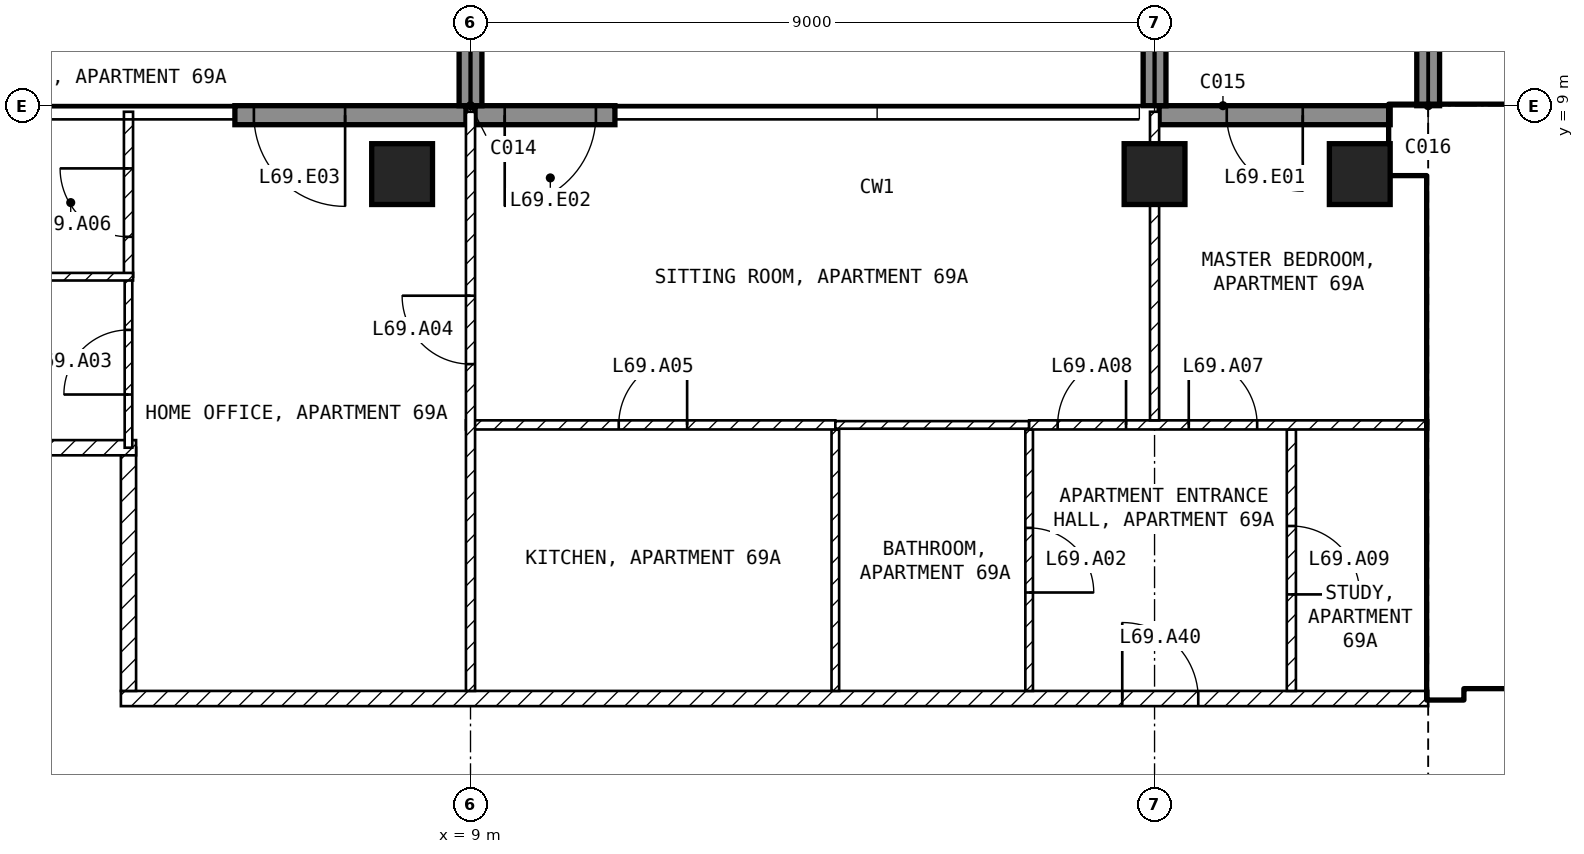
"""IFC4 building model, lengths in metres.
Left out: names, types, materials, properties, quantities, classifications, styles, units other than length and angle.
Written with IfcOpenShell. Run it as: python <this file> out.ifc"""

import sys

from ifc_helpers import new_model, si_unit, direction, frame, frame_2d, origin, origin_2d, place, context, subcontext, project, spatial, rectangle, extrude, element, fill, save


model = new_model("IFC4")
c1 = context("Model", 3, precision=1e-05, world=origin(), true_north=direction((0.0, 1.0)))
c2 = subcontext(c1, "Body", "Model", "MODEL_VIEW")
j1 = project(units=[si_unit("LENGTHUNIT", "METRE"), si_unit("PLANEANGLEUNIT", "RADIAN")], contexts=[c1])
p1 = place(None, origin())
s1 = spatial("IfcSite", under=j1, at=p1, CompositionType="ELEMENT")
p2 = place(p1, origin())
s2 = spatial("IfcBuilding", under=s1, at=p2, CompositionType="ELEMENT")
p3 = place(p2, frame((0.0, 0.0, 271.0)))
s3 = spatial("IfcBuildingStorey", under=s2, at=p3, CompositionType="ELEMENT", Elevation=271.0)
for number, where, z_axis, x_axis in (
    (1, (8.1, 8.1, -0.25), (0.0, 0.0, 1.0), (1.0, 0.0, 0.0)),
    (2, (18.0, 8.1, -0.25), (0.0, 0.0, 1.0), (1.0, 0.0, 0.0)),
    (3, (20.7, 8.1, -0.25), (0.0, 0.0, 1.0), (1.0, 0.0, 0.0)),
):
    element("IfcColumn", number, at=place(p3, frame(where, z_axis=z_axis, x_axis=x_axis)), inside=s3, PredefinedType="COLUMN", context=c2, shape_type="SweptSolid", body=[
        extrude(rectangle(XDim=0.8, YDim=0.8, at=origin_2d()), origin(), (0.0, 0.0, 1.0), 3.5),
    ])
p4 = place(p3, frame((21.1, 8.875, 0.0), z_axis=(0.0, 0.0, 1.0), x_axis=(-1.0, 0.0, 0.0)))
e4 = element("IfcWall", 4, at=p4, inside=s3, PredefinedType="SOLIDWALL", context=c2, shape_type="SweptSolid", body=[
    extrude(rectangle(XDim=3.04, YDim=0.25, at=frame_2d((1.52, 0.0))), origin(), (0.0, 0.0, 1.0), 3.25),
])
p5 = place(p4, frame((1.15, 0.0, 0.0)))
e5 = element("IfcOpeningElement", 5, at=p5, cuts=e4, PredefinedType="OPENING", context=c2, shape_type="SweptSolid", body=[
    extrude(rectangle(XDim=1.0, YDim=2.4, at=frame_2d((0.5, 1.2))), frame((0.0, 0.135, 0.0), z_axis=(0.0, -1.0, 0.0), x_axis=(1.0, 0.0, 0.0)), (0.0, 0.0, 1.0), 0.27),
])
p6 = place(p3, frame((10.9, 8.875, 0.0), z_axis=(0.0, 0.0, 1.0), x_axis=(-1.0, 0.0, 0.0)))
e6 = element("IfcWall", 6, at=p6, inside=s3, PredefinedType="SOLIDWALL", context=c2, shape_type="SweptSolid", body=[
    extrude(rectangle(XDim=1.84, YDim=0.25, at=frame_2d((0.92, 0.0))), origin(), (0.0, 0.0, 1.0), 3.25),
])
p7 = place(p6, frame((0.25, 0.0, 0.0)))
e7 = element("IfcOpeningElement", 7, at=p7, cuts=e6, PredefinedType="OPENING", context=c2, shape_type="SweptSolid", body=[
    extrude(rectangle(XDim=1.2, YDim=2.4, at=frame_2d((0.6, 1.2))), frame((0.0, 0.135, 0.0), z_axis=(0.0, -1.0, 0.0), x_axis=(1.0, 0.0, 0.0)), (0.0, 0.0, 1.0), 0.27),
])
p8 = place(p3, frame((8.94, 8.875, 0.0), z_axis=(0.0, 0.0, 1.0), x_axis=(-1.0, 0.0, 0.0)))
e8 = element("IfcWall", 8, at=p8, inside=s3, PredefinedType="SOLIDWALL", context=c2, shape_type="SweptSolid", body=[
    extrude(rectangle(XDim=3.04, YDim=0.25, at=frame_2d((1.52, 0.0))), origin(), (0.0, 0.0, 1.0), 3.25),
])
p9 = place(p8, frame((1.59, 0.0, 0.0)))
e9 = element("IfcOpeningElement", 9, at=p9, cuts=e8, PredefinedType="OPENING", context=c2, shape_type="SweptSolid", body=[
    extrude(rectangle(XDim=1.2, YDim=2.4, at=frame_2d((0.6, 1.2))), frame((0.0, 0.135, 0.0), z_axis=(0.0, -1.0, 0.0), x_axis=(1.0, 0.0, 0.0)), (0.0, 0.0, 1.0), 0.27),
])
for number, where, z_axis, x_axis in (
    (10, (9.0, 9.0, 0.0), (0.0, 0.0, 1.0), (0.0, 1.0, 0.0)),
    (11, (18.0, 9.0, 0.0), (0.0, 0.0, 1.0), (0.0, 1.0, 0.0)),
    (12, (21.6, 9.0, 0.0), (0.0, 0.0, 1.0), (0.0, 1.0, 0.0)),
):
    element("IfcWall", number, at=place(p3, frame(where, z_axis=z_axis, x_axis=x_axis)), inside=s3, PredefinedType="SOLIDWALL", context=c2, shape_type="SweptSolid", body=[
        extrude(rectangle(XDim=2.7, YDim=0.3, at=frame_2d((1.35, 0.0))), origin(), (0.0, 0.0, 1.0), 3.25),
    ])
p10 = place(p3, frame((21.1, 8.55, 0.0), z_axis=(0.0, 0.0, 1.0), x_axis=(1.0, 0.0, 0.0)))
e13 = element("IfcWall", 13, at=p10, inside=s3, PredefinedType="SHEAR", context=c2, shape_type="SweptSolid", body=[
    extrude(rectangle(XDim=8.65, YDim=0.9, at=frame_2d((4.325, 0.0))), origin(), (0.0, 0.0, 1.0), 3.25),
])
p11 = place(p3, frame((21.825, 1.2, 0.0), z_axis=(0.0, 0.0, 1.0), x_axis=(0.0, 1.0, 0.0)))
e14 = element("IfcWall", 14, at=p11, inside=s3, PredefinedType="SHEAR", context=c2, shape_type="SweptSolid", body=[
    extrude(rectangle(XDim=6.9, YDim=0.45, at=frame_2d((3.45, 0.0))), origin(), (0.0, 0.0, 1.0), 3.25),
])
p12 = place(p3, frame((22.05, 1.45, 0.0), z_axis=(0.0, 0.0, 1.0), x_axis=(1.0, 0.0, 0.0)))
e15 = element("IfcWall", 15, at=p12, inside=s3, PredefinedType="SOLIDWALL", context=c2, shape_type="SweptSolid", body=[
    extrude(rectangle(XDim=11.3, YDim=0.2, at=frame_2d((5.65, 0.0))), origin(), (0.0, 0.0, 1.0), 3.25),
])
p13 = place(p12, frame((0.75, 0.0, 0.0)))
e16 = element("IfcOpeningElement", 16, at=p13, cuts=e15, PredefinedType="OPENING", context=c2, shape_type="SweptSolid", body=[
    extrude(rectangle(XDim=1.0, YDim=2.1, at=frame_2d((0.5, 1.05))), frame((0.0, 0.11, 0.0), z_axis=(0.0, -1.0, 0.0), x_axis=(1.0, 0.0, 0.0)), (0.0, 0.0, 1.0), 0.22),
])
p14 = place(p12, frame((3.25, 0.0, 0.0)))
e17 = element("IfcOpeningElement", 17, at=p14, cuts=e15, PredefinedType="OPENING", context=c2, shape_type="SweptSolid", body=[
    extrude(rectangle(XDim=1.0, YDim=2.1, at=frame_2d((0.5, 1.05))), frame((0.0, 0.11, 0.0), z_axis=(0.0, -1.0, 0.0), x_axis=(1.0, 0.0, 0.0)), (0.0, 0.0, 1.0), 0.22),
])
p15 = place(p12, frame((9.225, 0.0, 0.0)))
e18 = element("IfcOpeningElement", 18, at=p15, cuts=e15, PredefinedType="OPENING", context=c2, shape_type="SweptSolid", body=[
    extrude(rectangle(XDim=0.9, YDim=2.1, at=frame_2d((0.45, 1.05))), frame((0.0, 0.11, 0.0), z_axis=(0.0, -1.0, 0.0), x_axis=(1.0, 0.0, 0.0)), (0.0, 0.0, 1.0), 0.22),
])
p16 = place(p3, frame((22.05, 5.15, 0.0), z_axis=(0.0, 0.0, 1.0), x_axis=(1.0, 0.0, 0.0)))
e19 = element("IfcWall", 19, at=p16, inside=s3, PredefinedType="SOLIDWALL", context=c2, shape_type="SweptSolid", body=[
    extrude(rectangle(XDim=6.3, YDim=0.2, at=frame_2d((3.15, 0.0))), origin(), (0.0, 0.0, 1.0), 3.25),
])
p17 = place(p16, frame((0.2, 0.0, 0.0)))
e20 = element("IfcOpeningElement", 20, at=p17, cuts=e19, PredefinedType="OPENING", context=c2, shape_type="SweptSolid", body=[
    extrude(rectangle(XDim=1.0, YDim=2.1, at=frame_2d((0.5, 1.05))), frame((0.0, 0.11, 0.0), z_axis=(0.0, -1.0, 0.0), x_axis=(1.0, 0.0, 0.0)), (0.0, 0.0, 1.0), 0.22),
])
p18 = place(p3, frame((4.4, 1.2, 0.0), z_axis=(0.0, 0.0, 1.0), x_axis=(1.0, 0.0, 0.0)))
e21 = element("IfcWall", 21, at=p18, inside=s3, PredefinedType="PARTITIONING", context=c2, shape_type="SweptSolid", body=[
    extrude(rectangle(XDim=17.2, YDim=0.2, at=frame_2d((8.6, 0.0))), origin(), (0.0, 0.0, 1.0), 3.25),
])
p19 = place(p18, frame((13.175, 0.0, 0.0)))
e22 = element("IfcOpeningElement", 22, at=p19, cuts=e21, PredefinedType="OPENING", context=c2, shape_type="SweptSolid", body=[
    extrude(rectangle(XDim=1.0, YDim=2.1, at=frame_2d((0.5, 1.05))), frame((0.0, 0.11, 0.0), z_axis=(0.0, -1.0, 0.0), x_axis=(1.0, 0.0, 0.0)), (0.0, 0.0, 1.0), 0.22),
])
p20 = place(p3, frame((4.5, 4.5, 0.0), z_axis=(0.0, 0.0, 1.0), x_axis=(0.0, -1.0, 0.0)))
e23 = element("IfcWall", 23, at=p20, inside=s3, PredefinedType="PARTITIONING", context=c2, shape_type="SweptSolid", body=[
    extrude(rectangle(XDim=3.2, YDim=0.2, at=frame_2d((1.6, 0.0))), origin(), (0.0, 0.0, 1.0), 3.25),
])
p21 = place(p3, frame((1.1, 4.5, 0.0), z_axis=(0.0, 0.0, 1.0), x_axis=(1.0, 0.0, 0.0)))
e24 = element("IfcWall", 24, at=p21, inside=s3, PredefinedType="PARTITIONING", context=c2, shape_type="SweptSolid", body=[
    extrude(rectangle(XDim=3.5, YDim=0.2, at=frame_2d((1.75, 0.0))), origin(), (0.0, 0.0, 1.0), 3.25),
])
p22 = place(p3, frame((13.8, 4.74, 0.0), z_axis=(0.0, 0.0, 1.0), x_axis=(0.0, -1.0, 0.0)))
e25 = element("IfcWall", 25, at=p22, inside=s3, PredefinedType="PARTITIONING", context=c2, shape_type="SweptSolid", body=[
    extrude(rectangle(XDim=3.44, YDim=0.1, at=frame_2d((1.72, 0.0))), origin(), (0.0, 0.0, 1.0), 3.25),
])
p23 = place(p3, frame((8.94, 4.8, 0.0), z_axis=(0.0, 0.0, 1.0), x_axis=(1.0, 0.0, 0.0)))
e26 = element("IfcWall", 26, at=p23, inside=s3, PredefinedType="PARTITIONING", context=c2, shape_type="SweptSolid", body=[
    extrude(rectangle(XDim=4.86, YDim=0.12, at=frame_2d((2.43, 0.0))), origin(), (0.0, 0.0, 1.0), 3.25),
])
p24 = place(p23, frame((2.01, 0.0, 0.0)))
e27 = element("IfcOpeningElement", 27, at=p24, cuts=e26, PredefinedType="OPENING", context=c2, shape_type="SweptSolid", body=[
    extrude(rectangle(XDim=0.9, YDim=2.1, at=frame_2d((0.45, 1.05))), frame((0.0, 0.07, 0.0), z_axis=(0.0, -1.0, 0.0), x_axis=(1.0, 0.0, 0.0)), (0.0, 0.0, 1.0), 0.14),
])
p25 = place(p3, frame((9.0, 1.3, 0.0), z_axis=(0.0, 0.0, 1.0), x_axis=(0.0, 1.0, 0.0)))
e28 = element("IfcWall", 28, at=p25, inside=s3, PredefinedType="PARTITIONING", context=c2, shape_type="SweptSolid", body=[
    extrude(rectangle(XDim=7.62, YDim=0.12, at=frame_2d((3.81, 0.0))), origin(), (0.0, 0.0, 1.0), 3.25),
])
p26 = place(p25, frame((4.3, 0.0, 0.0)))
e29 = element("IfcOpeningElement", 29, at=p26, cuts=e28, PredefinedType="OPENING", context=c2, shape_type="SweptSolid", body=[
    extrude(rectangle(XDim=0.9, YDim=2.1, at=frame_2d((0.45, 1.05))), frame((0.0, 0.07, 0.0), z_axis=(0.0, -1.0, 0.0), x_axis=(1.0, 0.0, 0.0)), (0.0, 0.0, 1.0), 0.14),
])
p27 = place(p3, frame((16.35, 4.74, 0.0), z_axis=(0.0, 0.0, 1.0), x_axis=(0.0, -1.0, 0.0)))
e30 = element("IfcWall", 30, at=p27, inside=s3, PredefinedType="PARTITIONING", context=c2, shape_type="SweptSolid", body=[
    extrude(rectangle(XDim=3.44, YDim=0.1, at=frame_2d((1.72, 0.0))), origin(), (0.0, 0.0, 1.0), 3.25),
])
p28 = place(p27, frame((1.295, 0.0, 0.0)))
e31 = element("IfcOpeningElement", 31, at=p28, cuts=e30, PredefinedType="OPENING", context=c2, shape_type="SweptSolid", body=[
    extrude(rectangle(XDim=0.85, YDim=2.1, at=frame_2d((0.425, 1.05))), frame((0.0, 0.06, 0.0), z_axis=(0.0, -1.0, 0.0), x_axis=(1.0, 0.0, 0.0)), (0.0, 0.0, 1.0), 0.12),
])
p29 = place(p3, frame((13.8, 4.8, 0.0), z_axis=(0.0, 0.0, 1.0), x_axis=(1.0, 0.0, 0.0)))
e32 = element("IfcWall", 32, at=p29, inside=s3, PredefinedType="PARTITIONING", context=c2, shape_type="SweptSolid", body=[
    extrude(rectangle(XDim=2.55, YDim=0.1, at=frame_2d((1.275, 0.0))), origin(), (0.0, 0.0, 1.0), 3.25),
])
p30 = place(p3, frame((19.8, 4.74, 0.0), z_axis=(0.0, 0.0, 1.0), x_axis=(0.0, -1.0, 0.0)))
e33 = element("IfcWall", 33, at=p30, inside=s3, PredefinedType="PARTITIONING", context=c2, shape_type="SweptSolid", body=[
    extrude(rectangle(XDim=3.44, YDim=0.12, at=frame_2d((1.72, 0.0))), origin(), (0.0, 0.0, 1.0), 3.25),
])
p31 = place(p30, frame((1.27, 0.0, 0.0)))
e34 = element("IfcOpeningElement", 34, at=p31, cuts=e33, PredefinedType="OPENING", context=c2, shape_type="SweptSolid", body=[
    extrude(rectangle(XDim=0.9, YDim=2.1, at=frame_2d((0.45, 1.05))), frame((0.0, 0.07, 0.0), z_axis=(0.0, -1.0, 0.0), x_axis=(1.0, 0.0, 0.0)), (0.0, 0.0, 1.0), 0.14),
])
p32 = place(p3, frame((16.35, 4.8, 0.0), z_axis=(0.0, 0.0, 1.0), x_axis=(1.0, 0.0, 0.0)))
e35 = element("IfcWall", 35, at=p32, inside=s3, PredefinedType="PARTITIONING", context=c2, shape_type="SweptSolid", body=[
    extrude(rectangle(XDim=5.25, YDim=0.12, at=frame_2d((2.625, 0.0))), origin(), (0.0, 0.0, 1.0), 3.25),
])
p33 = place(p32, frame((2.1, 0.0, 0.0)))
e36 = element("IfcOpeningElement", 36, at=p33, cuts=e35, PredefinedType="OPENING", context=c2, shape_type="SweptSolid", body=[
    extrude(rectangle(XDim=0.9, YDim=2.1, at=frame_2d((0.45, 1.05))), frame((0.0, 0.07, 0.0), z_axis=(0.0, -1.0, 0.0), x_axis=(1.0, 0.0, 0.0)), (0.0, 0.0, 1.0), 0.14),
])
p34 = place(p32, frame((0.375, 0.0, 0.0)))
e37 = element("IfcOpeningElement", 37, at=p34, cuts=e35, PredefinedType="OPENING", context=c2, shape_type="SweptSolid", body=[
    extrude(rectangle(XDim=0.9, YDim=2.1, at=frame_2d((0.45, 1.05))), frame((0.0, 0.07, 0.0), z_axis=(0.0, -1.0, 0.0), x_axis=(1.0, 0.0, 0.0)), (0.0, 0.0, 1.0), 0.14),
])
p35 = place(p3, frame((18.0, 8.92, 0.0), z_axis=(0.0, 0.0, 1.0), x_axis=(0.0, -1.0, 0.0)))
e38 = element("IfcWall", 38, at=p35, inside=s3, PredefinedType="PARTITIONING", context=c2, shape_type="SweptSolid", body=[
    extrude(rectangle(XDim=4.06, YDim=0.12, at=frame_2d((2.03, 0.0))), origin(), (0.0, 0.0, 1.0), 2.496),
])
p36 = place(p3, frame((4.5, 4.5, 0.0), z_axis=(0.0, 0.0, 1.0), x_axis=(0.0, 1.0, 0.0)))
e39 = element("IfcWall", 39, at=p36, inside=s3, PredefinedType="PARTITIONING", context=c2, shape_type="SweptSolid", body=[
    extrude(rectangle(XDim=2.25, YDim=0.1, at=frame_2d((1.125, 0.0))), origin(), (0.0, 0.0, 1.0), 3.25),
])
p37 = place(p36, frame((0.7, 0.0, 0.0)))
e40 = element("IfcOpeningElement", 40, at=p37, cuts=e39, PredefinedType="OPENING", context=c2, shape_type="SweptSolid", body=[
    extrude(rectangle(XDim=0.85, YDim=2.1, at=frame_2d((0.425, 1.05))), frame((0.0, 0.06, 0.0), z_axis=(0.0, -1.0, 0.0), x_axis=(1.0, 0.0, 0.0)), (0.0, 0.0, 1.0), 0.12),
])
p38 = place(p3, frame((4.5, 6.75, 0.0), z_axis=(0.0, 0.0, 1.0), x_axis=(0.0, 1.0, 0.0)))
e41 = element("IfcWall", 41, at=p38, inside=s3, PredefinedType="PARTITIONING", context=c2, shape_type="SweptSolid", body=[
    extrude(rectangle(XDim=2.17, YDim=0.12, at=frame_2d((1.085, 0.0))), origin(), (0.0, 0.0, 1.0), 3.25),
])
p39 = place(p38, frame((0.525, 0.0, 0.0)))
e42 = element("IfcOpeningElement", 42, at=p39, cuts=e41, PredefinedType="OPENING", context=c2, shape_type="SweptSolid", body=[
    extrude(rectangle(XDim=0.9, YDim=2.1, at=frame_2d((0.45, 1.05))), frame((0.0, 0.07, 0.0), z_axis=(0.0, -1.0, 0.0), x_axis=(1.0, 0.0, 0.0)), (0.0, 0.0, 1.0), 0.14),
])
p40 = place(p3, frame((1.1, 6.75, 0.0), z_axis=(0.0, 0.0, 1.0), x_axis=(1.0, 0.0, 0.0)))
e43 = element("IfcWall", 43, at=p40, inside=s3, PredefinedType="PARTITIONING", context=c2, shape_type="SweptSolid", body=[
    extrude(rectangle(XDim=3.46, YDim=0.1, at=frame_2d((1.73, 0.0))), origin(), (0.0, 0.0, 1.0), 3.25),
])
p41 = place(p5, origin())
e44 = element("IfcDoor", 44, at=p41, inside=s3, OperationType="SINGLE_SWING_LEFT", PredefinedType="DOOR", context=c2, shape_type="SweptSolid", body=[
    extrude(rectangle(XDim=1.0, YDim=2.4, at=frame_2d((0.5, 1.2))), frame((0.0, 0.025, 0.0), z_axis=(0.0, -1.0, 0.0), x_axis=(1.0, 0.0, 0.0)), (0.0, 0.0, 1.0), 0.05),
])
fill(e5, e44)
p42 = place(p7, origin())
e45 = element("IfcDoor", 45, at=p42, inside=s3, OperationType="SINGLE_SWING_RIGHT", PredefinedType="DOOR", context=c2, shape_type="SweptSolid", body=[
    extrude(rectangle(XDim=1.2, YDim=2.4, at=frame_2d((0.6, 1.2))), frame((0.0, 0.025, 0.0), z_axis=(0.0, -1.0, 0.0), x_axis=(1.0, 0.0, 0.0)), (0.0, 0.0, 1.0), 0.05),
])
fill(e7, e45)
p43 = place(p9, origin())
e46 = element("IfcDoor", 46, at=p43, inside=s3, OperationType="SINGLE_SWING_LEFT", PredefinedType="DOOR", context=c2, shape_type="SweptSolid", body=[
    extrude(rectangle(XDim=1.2, YDim=2.4, at=frame_2d((0.6, 1.2))), frame((0.0, 0.025, 0.0), z_axis=(0.0, -1.0, 0.0), x_axis=(1.0, 0.0, 0.0)), (0.0, 0.0, 1.0), 0.05),
])
fill(e9, e46)
p44 = place(p17, origin())
e47 = element("IfcDoor", 47, at=p44, inside=s3, OperationType="SINGLE_SWING_LEFT", PredefinedType="DOOR", context=c2, shape_type="SweptSolid", body=[
    extrude(rectangle(XDim=1.0, YDim=2.1, at=frame_2d((0.5, 1.05))), frame((0.0, 0.025, 0.0), z_axis=(0.0, -1.0, 0.0), x_axis=(1.0, 0.0, 0.0)), (0.0, 0.0, 1.0), 0.05),
])
fill(e20, e47)
p45 = place(p28, origin())
e48 = element("IfcDoor", 48, at=p45, inside=s3, OperationType="SINGLE_SWING_RIGHT", PredefinedType="DOOR", context=c2, shape_type="SweptSolid", body=[
    extrude(rectangle(XDim=0.85, YDim=2.1, at=frame_2d((0.425, 1.05))), frame((0.0, 0.025, 0.0), z_axis=(0.0, -1.0, 0.0), x_axis=(1.0, 0.0, 0.0)), (0.0, 0.0, 1.0), 0.05),
])
fill(e31, e48)
p46 = place(p37, origin())
e49 = element("IfcDoor", 49, at=p46, inside=s3, OperationType="SINGLE_SWING_LEFT", PredefinedType="DOOR", context=c2, shape_type="SweptSolid", body=[
    extrude(rectangle(XDim=0.85, YDim=2.1, at=frame_2d((0.425, 1.05))), frame((0.0, 0.025, 0.0), z_axis=(0.0, -1.0, 0.0), x_axis=(1.0, 0.0, 0.0)), (0.0, 0.0, 1.0), 0.05),
])
fill(e40, e49)
p47 = place(p26, origin())
e50 = element("IfcDoor", 50, at=p47, inside=s3, OperationType="SINGLE_SWING_RIGHT", PredefinedType="DOOR", context=c2, shape_type="SweptSolid", body=[
    extrude(rectangle(XDim=0.9, YDim=2.1, at=frame_2d((0.45, 1.05))), frame((0.0, 0.025, 0.0), z_axis=(0.0, -1.0, 0.0), x_axis=(1.0, 0.0, 0.0)), (0.0, 0.0, 1.0), 0.05),
])
fill(e29, e50)
p48 = place(p24, origin())
e51 = element("IfcDoor", 51, at=p48, inside=s3, OperationType="SINGLE_SWING_RIGHT", PredefinedType="DOOR", context=c2, shape_type="SweptSolid", body=[
    extrude(rectangle(XDim=0.9, YDim=2.1, at=frame_2d((0.45, 1.05))), frame((0.0, 0.025, 0.0), z_axis=(0.0, -1.0, 0.0), x_axis=(1.0, 0.0, 0.0)), (0.0, 0.0, 1.0), 0.05),
])
fill(e27, e51)
p49 = place(p39, origin())
e52 = element("IfcDoor", 52, at=p49, inside=s3, OperationType="SINGLE_SWING_RIGHT", PredefinedType="DOOR", context=c2, shape_type="SweptSolid", body=[
    extrude(rectangle(XDim=0.9, YDim=2.1, at=frame_2d((0.45, 1.05))), frame((0.0, 0.025, 0.0), z_axis=(0.0, -1.0, 0.0), x_axis=(1.0, 0.0, 0.0)), (0.0, 0.0, 1.0), 0.05),
])
fill(e42, e52)
p50 = place(p33, origin())
e53 = element("IfcDoor", 53, at=p50, inside=s3, OperationType="SINGLE_SWING_LEFT", PredefinedType="DOOR", context=c2, shape_type="SweptSolid", body=[
    extrude(rectangle(XDim=0.9, YDim=2.1, at=frame_2d((0.45, 1.05))), frame((0.0, 0.025, 0.0), z_axis=(0.0, -1.0, 0.0), x_axis=(1.0, 0.0, 0.0)), (0.0, 0.0, 1.0), 0.05),
])
fill(e36, e53)
p51 = place(p34, origin())
e54 = element("IfcDoor", 54, at=p51, inside=s3, OperationType="SINGLE_SWING_RIGHT", PredefinedType="DOOR", context=c2, shape_type="SweptSolid", body=[
    extrude(rectangle(XDim=0.9, YDim=2.1, at=frame_2d((0.45, 1.05))), frame((0.0, 0.025, 0.0), z_axis=(0.0, -1.0, 0.0), x_axis=(1.0, 0.0, 0.0)), (0.0, 0.0, 1.0), 0.05),
])
fill(e37, e54)
p52 = place(p31, origin())
e55 = element("IfcDoor", 55, at=p52, inside=s3, OperationType="SINGLE_SWING_RIGHT", PredefinedType="DOOR", context=c2, shape_type="SweptSolid", body=[
    extrude(rectangle(XDim=0.9, YDim=2.1, at=frame_2d((0.45, 1.05))), frame((0.0, 0.025, 0.0), z_axis=(0.0, -1.0, 0.0), x_axis=(1.0, 0.0, 0.0)), (0.0, 0.0, 1.0), 0.05),
])
fill(e34, e55)
p53 = place(p19, origin())
e56 = element("IfcDoor", 56, at=p53, inside=s3, OperationType="SINGLE_SWING_LEFT", PredefinedType="DOOR", context=c2, shape_type="SweptSolid", body=[
    extrude(rectangle(XDim=1.0, YDim=2.1, at=frame_2d((0.5, 1.05))), frame((0.0, 0.025, 0.0), z_axis=(0.0, -1.0, 0.0), x_axis=(1.0, 0.0, 0.0)), (0.0, 0.0, 1.0), 0.05),
])
fill(e22, e56)
save(model, sys.argv[1])
